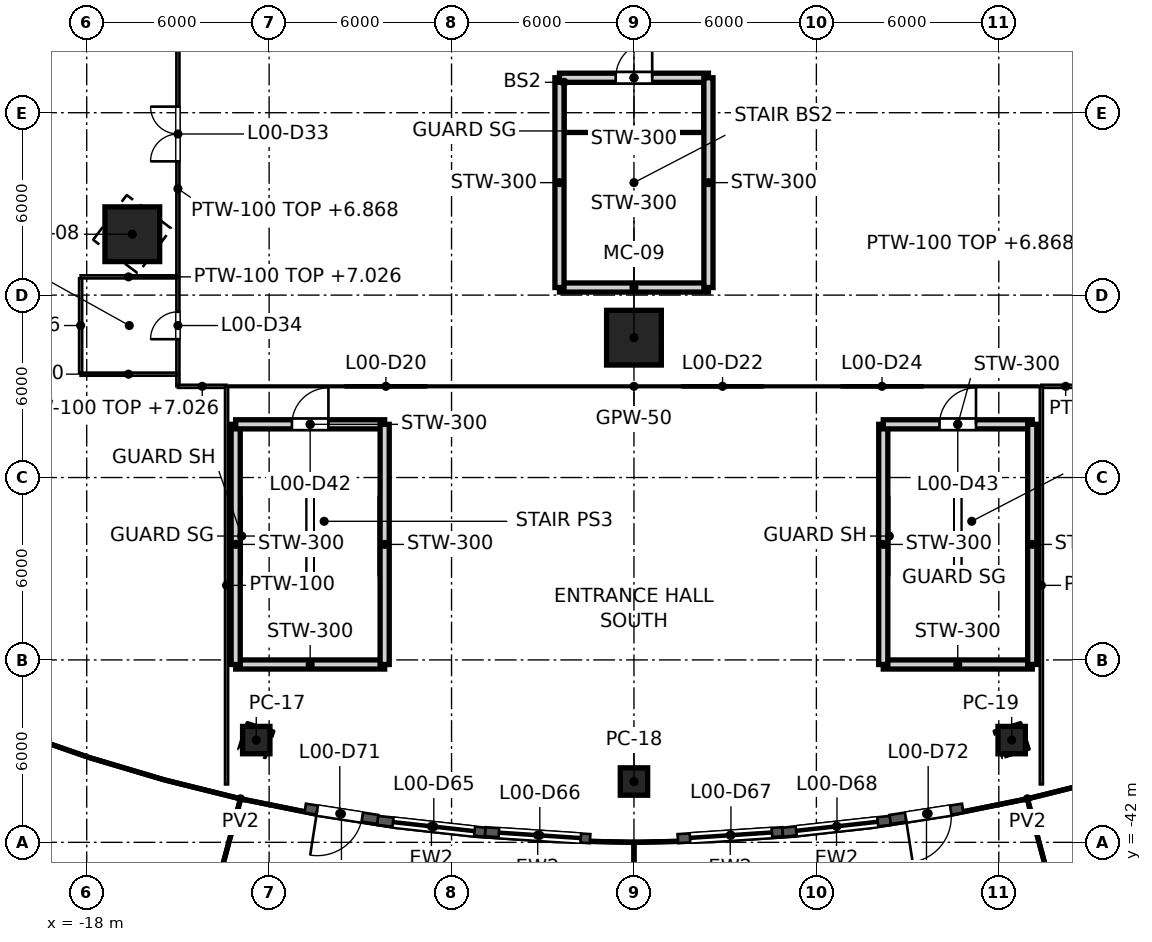
"""IFC4 building model, lengths in metres.
Left out: names, types, materials, properties, quantities, classifications, styles, units other than length and angle.
Written with IfcOpenShell. Run it as: python <this file> out.ifc"""

import sys

from ifc_helpers import new_model, si_unit, direction, frame, frame_2d, origin, origin_2d, place, context, subcontext, project, spatial, rectangle, hollow_rectangle, extrude, element, fill, save


model = new_model("IFC4")
c1 = context("Model", 3, precision=1e-05, world=origin(), true_north=direction((0.0, 1.0)))
c2 = subcontext(c1, "Body", "Model", "MODEL_VIEW")
j1 = project(units=[si_unit("LENGTHUNIT", "METRE"), si_unit("PLANEANGLEUNIT", "RADIAN")], contexts=[c1])
p1 = place(None, origin())
s1 = spatial("IfcSite", under=j1, at=p1, CompositionType="ELEMENT")
p2 = place(p1, origin())
s2 = spatial("IfcBuilding", under=s1, at=p2, CompositionType="ELEMENT")
p3 = place(p2, origin())
s3 = spatial("IfcBuildingStorey", under=s2, at=p3, CompositionType="ELEMENT", Elevation=0.0)
for number, where, z_axis, x_axis in (
    (1, (-16.5, -21.997, 0.0), (0.0, 0.0, 1.0), (-0.6, -0.8, 0.0)),
    (2, (0.0, -25.4, 0.0), (0.0, 0.0, 1.0), (0.0, -1.0, 0.0)),
):
    element("IfcColumn", number, at=place(p3, frame(where, z_axis=z_axis, x_axis=x_axis)), inside=s3, PredefinedType="COLUMN", context=c2, shape_type="SweptSolid", body=[
        extrude(hollow_rectangle(XDim=1.8, YDim=1.8, WallThickness=0.08, at=origin_2d()), origin(), (0.0, 0.0, 1.0), 8.0),
    ])
for number, where, z_axis, x_axis in (
    (3, (-12.423, -38.637, 0.0), (0.0, 0.0, 1.0), (-0.306, -0.952, 0.0)),
    (4, (0.0, -40.0, 0.0), (0.0, 0.0, 1.0), (0.0, -1.0, 0.0)),
    (5, (12.423, -38.637, 0.0), (0.0, 0.0, 1.0), (0.306, -0.952, 0.0)),
):
    element("IfcColumn", number, at=place(p3, frame(where, z_axis=z_axis, x_axis=x_axis)), inside=s3, PredefinedType="COLUMN", context=c2, shape_type="SweptSolid", body=[
        extrude(hollow_rectangle(XDim=0.9, YDim=0.9, WallThickness=0.04, at=origin_2d()), origin(), (0.0, 0.0, 1.0), 8.0),
    ])
p4 = place(p3, frame((-8.434, -41.278, 0.0), z_axis=(0.0, 0.0, 1.0), x_axis=(0.993937913469, -0.109942822269, 0.0)))
e6 = element("IfcWall", 6, at=p4, inside=s3, PredefinedType="SOLIDWALL", context=c2, shape_type="SweptSolid", body=[
    extrude(rectangle(XDim=3.564, YDim=0.3, at=frame_2d((1.782, 0.0))), origin(), (0.0, 0.0, 1.0), 7.8),
])
p5 = place(p4, frame((0.511, 0.0, 0.0)))
e7 = element("IfcOpeningElement", 7, at=p5, cuts=e6, PredefinedType="OPENING", context=c2, shape_type="SweptSolid", body=[
    extrude(rectangle(XDim=2.7, YDim=2.4, at=frame_2d((1.35, 1.2))), frame((0.0, 0.15, 0.0), z_axis=(0.0, -1.0, 0.0), x_axis=(1.0, 0.0, 0.0)), (0.0, 0.0, 1.0), 0.3),
])
p6 = place(p3, frame((-4.889, -41.652, 0.0), z_axis=(0.0, 0.0, 1.0), x_axis=(0.997821919581, -0.065965269678, 0.0)))
e8 = element("IfcWall", 8, at=p6, inside=s3, PredefinedType="SOLIDWALL", context=c2, shape_type="SweptSolid", body=[
    extrude(rectangle(XDim=3.453, YDim=0.3, at=frame_2d((1.727, 0.0))), origin(), (0.0, 0.0, 1.0), 7.8),
])
p7 = place(p6, frame((0.447, 0.0, 0.0)))
e9 = element("IfcOpeningElement", 9, at=p7, cuts=e8, PredefinedType="OPENING", context=c2, shape_type="SweptSolid", body=[
    extrude(rectangle(XDim=2.7, YDim=2.4, at=frame_2d((1.35, 1.2))), frame((0.0, 0.15, 0.0), z_axis=(0.0, -1.0, 0.0), x_axis=(1.0, 0.0, 0.0)), (0.0, 0.0, 1.0), 0.3),
])
p8 = place(p3, frame((1.444, -41.88, 0.0), z_axis=(0.0, 0.0, 1.0), x_axis=(0.997821919581, 0.065965269678, 0.0)))
e10 = element("IfcWall", 10, at=p8, inside=s3, PredefinedType="SOLIDWALL", context=c2, shape_type="SweptSolid", body=[
    extrude(rectangle(XDim=3.453, YDim=0.3, at=frame_2d((1.727, 0.0))), origin(), (0.0, 0.0, 1.0), 7.8),
])
p9 = place(p8, frame((0.4, 0.0, 0.0)))
e11 = element("IfcOpeningElement", 11, at=p9, cuts=e10, PredefinedType="OPENING", context=c2, shape_type="SweptSolid", body=[
    extrude(rectangle(XDim=2.7, YDim=2.4, at=frame_2d((1.35, 1.2))), frame((0.0, 0.15, 0.0), z_axis=(0.0, -1.0, 0.0), x_axis=(1.0, 0.0, 0.0)), (0.0, 0.0, 1.0), 0.3),
])
p10 = place(p3, frame((4.891, -41.67, 0.0), z_axis=(0.0, 0.0, 1.0), x_axis=(0.993937913469, 0.109942822269, 0.0)))
e12 = element("IfcWall", 12, at=p10, inside=s3, PredefinedType="SOLIDWALL", context=c2, shape_type="SweptSolid", body=[
    extrude(rectangle(XDim=3.564, YDim=0.3, at=frame_2d((1.782, 0.0))), origin(), (0.0, 0.0, 1.0), 7.8),
])
p11 = place(p10, frame((0.447, 0.0, 0.0)))
e13 = element("IfcOpeningElement", 13, at=p11, cuts=e12, PredefinedType="OPENING", context=c2, shape_type="SweptSolid", body=[
    extrude(rectangle(XDim=2.7, YDim=2.4, at=frame_2d((1.35, 1.2))), frame((0.0, 0.15, 0.0), z_axis=(0.0, -1.0, 0.0), x_axis=(1.0, 0.0, 0.0)), (0.0, 0.0, 1.0), 0.3),
])
p12 = place(p3, frame((-8.43, -41.248, 0.0), z_axis=(0.0, 0.0, 1.0), x_axis=(-0.988096306645, 0.153836565205, 0.0)))
e14 = element("IfcWall", 14, at=p12, inside=s3, PredefinedType="SOLIDWALL", context=c2, shape_type="SweptSolid", body=[
    extrude(rectangle(XDim=2.412, YDim=0.3, at=frame_2d((1.206, 0.0))), origin(), (0.0, 0.0, 1.0), 7.8),
])
p13 = place(p12, frame((0.512, 0.0, 0.0)))
e15 = element("IfcOpeningElement", 15, at=p13, cuts=e14, PredefinedType="OPENING", context=c2, shape_type="SweptSolid", body=[
    extrude(rectangle(XDim=1.5, YDim=2.1, at=frame_2d((0.75, 1.05))), frame((0.0, 0.15, 0.0), z_axis=(0.0, -1.0, 0.0), x_axis=(1.0, 0.0, 0.0)), (0.0, 0.0, 1.0), 0.3),
])
p14 = place(p3, frame((10.813, -40.877, 0.0), z_axis=(0.0, 0.0, 1.0), x_axis=(-0.988096306645, -0.153836565205, 0.0)))
e16 = element("IfcWall", 16, at=p14, inside=s3, PredefinedType="SOLIDWALL", context=c2, shape_type="SweptSolid", body=[
    extrude(rectangle(XDim=2.412, YDim=0.3, at=frame_2d((1.206, 0.0))), origin(), (0.0, 0.0, 1.0), 7.8),
])
p15 = place(p14, frame((0.4, 0.0, 0.0)))
e17 = element("IfcOpeningElement", 17, at=p15, cuts=e16, PredefinedType="OPENING", context=c2, shape_type="SweptSolid", body=[
    extrude(rectangle(XDim=1.5, YDim=2.1, at=frame_2d((0.75, 1.05))), frame((0.0, 0.15, 0.0), z_axis=(0.0, -1.0, 0.0), x_axis=(1.0, 0.0, 0.0)), (0.0, 0.0, 1.0), 0.3),
])
p16 = place(p3, frame((-8.2, -36.15, 0.0), z_axis=(0.0, 0.0, 1.0), x_axis=(-1.0, 0.0, 0.0)))
e18 = element("IfcWall", 18, at=p16, inside=s3, PredefinedType="SOLIDWALL", context=c2, shape_type="SweptSolid", body=[
    extrude(rectangle(XDim=4.9, YDim=0.3, at=frame_2d((2.45, 0.0))), origin(), (0.0, 0.0, 1.0), 7.8),
])
p17 = place(p3, frame((-13.1, -36.15, 0.0), z_axis=(0.0, 0.0, 1.0), x_axis=(0.0, 1.0, 0.0)))
e19 = element("IfcWall", 19, at=p17, inside=s3, PredefinedType="SOLIDWALL", context=c2, shape_type="SweptSolid", body=[
    extrude(rectangle(XDim=7.9, YDim=0.3, at=frame_2d((3.95, 0.0))), origin(), (0.0, 0.0, 1.0), 7.8),
])
p18 = place(p3, frame((-13.1, -28.25, 0.0), z_axis=(0.0, 0.0, 1.0), x_axis=(1.0, 0.0, 0.0)))
e20 = element("IfcWall", 20, at=p18, inside=s3, PredefinedType="SOLIDWALL", context=c2, shape_type="SweptSolid", body=[
    extrude(rectangle(XDim=4.9, YDim=0.3, at=frame_2d((2.45, 0.0))), origin(), (0.0, 0.0, 1.0), 7.8),
])
p19 = place(p18, frame((1.85, 0.0, 0.0)))
e21 = element("IfcOpeningElement", 21, at=p19, cuts=e20, PredefinedType="OPENING", context=c2, shape_type="SweptSolid", body=[
    extrude(rectangle(XDim=1.2, YDim=2.1, at=frame_2d((0.6, 1.05))), frame((0.0, 0.15, 0.0), z_axis=(0.0, -1.0, 0.0), x_axis=(1.0, 0.0, 0.0)), (0.0, 0.0, 1.0), 0.3),
])
p20 = place(p3, frame((-8.2, -28.25, 0.0), z_axis=(0.0, 0.0, 1.0), x_axis=(0.0, -1.0, 0.0)))
e22 = element("IfcWall", 22, at=p20, inside=s3, PredefinedType="SOLIDWALL", context=c2, shape_type="SweptSolid", body=[
    extrude(rectangle(XDim=7.9, YDim=0.3, at=frame_2d((3.95, 0.0))), origin(), (0.0, 0.0, 1.0), 7.8),
])
p21 = place(p3, frame((13.1, -36.15, 0.0), z_axis=(0.0, 0.0, 1.0), x_axis=(-1.0, 0.0, 0.0)))
e23 = element("IfcWall", 23, at=p21, inside=s3, PredefinedType="SOLIDWALL", context=c2, shape_type="SweptSolid", body=[
    extrude(rectangle(XDim=4.9, YDim=0.3, at=frame_2d((2.45, 0.0))), origin(), (0.0, 0.0, 1.0), 7.8),
])
p22 = place(p3, frame((8.2, -36.15, 0.0), z_axis=(0.0, 0.0, 1.0), x_axis=(0.0, 1.0, 0.0)))
e24 = element("IfcWall", 24, at=p22, inside=s3, PredefinedType="SOLIDWALL", context=c2, shape_type="SweptSolid", body=[
    extrude(rectangle(XDim=7.9, YDim=0.3, at=frame_2d((3.95, 0.0))), origin(), (0.0, 0.0, 1.0), 7.8),
])
p23 = place(p3, frame((8.2, -28.25, 0.0), z_axis=(0.0, 0.0, 1.0), x_axis=(1.0, 0.0, 0.0)))
e25 = element("IfcWall", 25, at=p23, inside=s3, PredefinedType="SOLIDWALL", context=c2, shape_type="SweptSolid", body=[
    extrude(rectangle(XDim=4.9, YDim=0.3, at=frame_2d((2.45, 0.0))), origin(), (0.0, 0.0, 1.0), 7.8),
])
p24 = place(p23, frame((1.85, 0.0, 0.0)))
e26 = element("IfcOpeningElement", 26, at=p24, cuts=e25, PredefinedType="OPENING", context=c2, shape_type="SweptSolid", body=[
    extrude(rectangle(XDim=1.2, YDim=2.1, at=frame_2d((0.6, 1.05))), frame((0.0, 0.15, 0.0), z_axis=(0.0, -1.0, 0.0), x_axis=(1.0, 0.0, 0.0)), (0.0, 0.0, 1.0), 0.3),
])
p25 = place(p3, frame((13.1, -28.25, 0.0), z_axis=(0.0, 0.0, 1.0), x_axis=(0.0, -1.0, 0.0)))
e27 = element("IfcWall", 27, at=p25, inside=s3, PredefinedType="SOLIDWALL", context=c2, shape_type="SweptSolid", body=[
    extrude(rectangle(XDim=7.9, YDim=0.3, at=frame_2d((3.95, 0.0))), origin(), (0.0, 0.0, 1.0), 7.8),
])
p26 = place(p3, frame((2.45, -23.75, 0.0), z_axis=(0.0, 0.0, 1.0), x_axis=(-1.0, 0.0, 0.0)))
e28 = element("IfcWall", 28, at=p26, inside=s3, PredefinedType="SOLIDWALL", context=c2, shape_type="SweptSolid", body=[
    extrude(rectangle(XDim=4.9, YDim=0.3, at=frame_2d((2.45, 0.0))), origin(), (0.0, 0.0, 1.0), 7.8),
])
p27 = place(p3, frame((-2.45, -23.75, 0.0), z_axis=(0.0, 0.0, 1.0), x_axis=(0.0, 1.0, 0.0)))
e29 = element("IfcWall", 29, at=p27, inside=s3, PredefinedType="SOLIDWALL", context=c2, shape_type="SweptSolid", body=[
    extrude(rectangle(XDim=6.9, YDim=0.3, at=frame_2d((3.45, 0.0))), origin(), (0.0, 0.0, 1.0), 7.8),
])
p28 = place(p3, frame((-2.45, -16.85, 0.0), z_axis=(0.0, 0.0, 1.0), x_axis=(1.0, 0.0, 0.0)))
e30 = element("IfcWall", 30, at=p28, inside=s3, PredefinedType="SOLIDWALL", context=c2, shape_type="SweptSolid", body=[
    extrude(rectangle(XDim=4.9, YDim=0.3, at=frame_2d((2.45, 0.0))), origin(), (0.0, 0.0, 1.0), 7.8),
])
p29 = place(p28, frame((1.85, 0.0, 0.0)))
e31 = element("IfcOpeningElement", 31, at=p29, cuts=e30, PredefinedType="OPENING", context=c2, shape_type="SweptSolid", body=[
    extrude(rectangle(XDim=1.2, YDim=2.1, at=frame_2d((0.6, 1.05))), frame((0.0, 0.15, 0.0), z_axis=(0.0, -1.0, 0.0), x_axis=(1.0, 0.0, 0.0)), (0.0, 0.0, 1.0), 0.3),
])
p30 = place(p3, frame((2.45, -16.85, 0.0), z_axis=(0.0, 0.0, 1.0), x_axis=(0.0, -1.0, 0.0)))
e32 = element("IfcWall", 32, at=p30, inside=s3, PredefinedType="SOLIDWALL", context=c2, shape_type="SweptSolid", body=[
    extrude(rectangle(XDim=6.9, YDim=0.3, at=frame_2d((3.45, 0.0))), origin(), (0.0, 0.0, 1.0), 7.8),
])
p31 = place(p3, frame((15.0, -27.0, 0.0), z_axis=(0.0, 0.0, 1.0), x_axis=(-1.0, 0.0, 0.0)))
e33 = element("IfcWall", 33, at=p31, inside=s3, PredefinedType="PARTITIONING", context=c2, shape_type="SweptSolid", body=[
    extrude(rectangle(XDim=1.6, YDim=0.1, at=frame_2d((0.8, 0.0))), origin(), (0.0, 0.0, 1.0), 7.026),
])
p32 = place(p3, frame((13.4, -27.0, 0.0), z_axis=(0.0, 0.0, 1.0), x_axis=(0.0, -1.0, 0.0)))
e34 = element("IfcWall", 34, at=p32, inside=s3, PredefinedType="PARTITIONING", context=c2, shape_type="SweptSolid", body=[
    extrude(rectangle(XDim=13.094, YDim=0.1, at=frame_2d((6.547, 0.0))), origin(), (0.0, 0.0, 1.0), 6.877),
])
p33 = place(p3, frame((-15.0, -14.0, 0.0), z_axis=(0.0, 0.0, 1.0), x_axis=(0.0, -1.0, 0.0)))
e35 = element("IfcWall", 35, at=p33, inside=s3, PredefinedType="PARTITIONING", context=c2, shape_type="SweptSolid", body=[
    extrude(rectangle(XDim=13.0, YDim=0.1, at=frame_2d((6.5, 0.0))), origin(), (0.0, 0.0, 1.0), 6.868),
])
p34 = place(p33, frame((3.8, 0.0, 0.0)))
e36 = element("IfcOpeningElement", 36, at=p34, cuts=e35, PredefinedType="OPENING", context=c2, shape_type="SweptSolid", body=[
    extrude(rectangle(XDim=1.8, YDim=2.1, at=frame_2d((0.9, 1.05))), frame((0.0, 0.05, 0.0), z_axis=(0.0, -1.0, 0.0), x_axis=(1.0, 0.0, 0.0)), (0.0, 0.0, 1.0), 0.1),
])
p35 = place(p33, frame((10.55, 0.0, 0.0)))
e37 = element("IfcOpeningElement", 37, at=p35, cuts=e35, PredefinedType="OPENING", context=c2, shape_type="SweptSolid", body=[
    extrude(rectangle(XDim=0.9, YDim=2.1, at=frame_2d((0.45, 1.05))), frame((0.0, 0.05, 0.0), z_axis=(0.0, -1.0, 0.0), x_axis=(1.0, 0.0, 0.0)), (0.0, 0.0, 1.0), 0.1),
])
p36 = place(p3, frame((-15.0, -27.0, 0.0), z_axis=(0.0, 0.0, 1.0), x_axis=(1.0, 0.0, 0.0)))
e38 = element("IfcWall", 38, at=p36, inside=s3, PredefinedType="PARTITIONING", context=c2, shape_type="SweptSolid", body=[
    extrude(rectangle(XDim=1.6, YDim=0.1, at=frame_2d((0.8, 0.0))), origin(), (0.0, 0.0, 1.0), 7.026),
])
p37 = place(p3, frame((-13.4, -27.0, 0.0), z_axis=(0.0, 0.0, 1.0), x_axis=(0.0, -1.0, 0.0)))
e39 = element("IfcWall", 39, at=p37, inside=s3, PredefinedType="PARTITIONING", context=c2, shape_type="SweptSolid", body=[
    extrude(rectangle(XDim=13.094, YDim=0.1, at=frame_2d((6.547, 0.0))), origin(), (0.0, 0.0, 1.0), 6.877),
])
p38 = place(p3, frame((-13.304, -27.0, 0.0), z_axis=(0.0, 0.0, 1.0), x_axis=(1.0, 0.0, 0.0)))
e40 = element("IfcWall", 40, at=p38, inside=s3, PredefinedType="PARTITIONING", context=c2, shape_type="SweptSolid", body=[
    extrude(rectangle(XDim=26.608, YDim=0.05, at=frame_2d((13.304, 0.0))), origin(), (0.0, 0.0, 1.0), 7.026),
])
p39 = place(p38, frame((3.796, 0.0, 0.0)))
e41 = element("IfcOpeningElement", 41, at=p39, cuts=e40, PredefinedType="OPENING", context=c2, shape_type="SweptSolid", body=[
    extrude(rectangle(XDim=2.7, YDim=2.4, at=frame_2d((1.35, 1.2))), frame((0.0, 0.025, 0.0), z_axis=(0.0, -1.0, 0.0), x_axis=(1.0, 0.0, 0.0)), (0.0, 0.0, 1.0), 0.05),
])
p40 = place(p38, frame((14.868, 0.0, 0.0)))
e42 = element("IfcOpeningElement", 42, at=p40, cuts=e40, PredefinedType="OPENING", context=c2, shape_type="SweptSolid", body=[
    extrude(rectangle(XDim=2.7, YDim=2.4, at=frame_2d((1.35, 1.2))), frame((0.0, 0.025, 0.0), z_axis=(0.0, -1.0, 0.0), x_axis=(1.0, 0.0, 0.0)), (0.0, 0.0, 1.0), 0.05),
])
p41 = place(p38, frame((20.112, 0.0, 0.0)))
e43 = element("IfcOpeningElement", 43, at=p41, cuts=e40, PredefinedType="OPENING", context=c2, shape_type="SweptSolid", body=[
    extrude(rectangle(XDim=2.7, YDim=2.4, at=frame_2d((1.35, 1.2))), frame((0.0, 0.025, 0.0), z_axis=(0.0, -1.0, 0.0), x_axis=(1.0, 0.0, 0.0)), (0.0, 0.0, 1.0), 0.05),
])
p42 = place(p3, frame((-18.2, -26.6, 0.0), z_axis=(0.0, 0.0, 1.0), x_axis=(1.0, 0.0, 0.0)))
e44 = element("IfcWall", 44, at=p42, inside=s3, PredefinedType="PARTITIONING", context=c2, shape_type="SweptSolid", body=[
    extrude(rectangle(XDim=3.15, YDim=0.1, at=frame_2d((1.575, 0.0))), origin(), (0.0, 0.0, 1.0), 7.8),
])
p43 = place(p3, frame((-18.2, -23.4, 0.0), z_axis=(0.0, 0.0, 1.0), x_axis=(1.0, 0.0, 0.0)))
e45 = element("IfcWall", 45, at=p43, inside=s3, PredefinedType="PARTITIONING", context=c2, shape_type="SweptSolid", body=[
    extrude(rectangle(XDim=3.15, YDim=0.1, at=frame_2d((1.575, 0.0))), origin(), (0.0, 0.0, 1.0), 7.026),
])
p44 = place(p3, frame((-18.2, -26.55, 0.0), z_axis=(0.0, 0.0, 1.0), x_axis=(0.0, 1.0, 0.0)))
e46 = element("IfcWall", 46, at=p44, inside=s3, PredefinedType="PARTITIONING", context=c2, shape_type="SweptSolid", body=[
    extrude(rectangle(XDim=3.1, YDim=0.1, at=frame_2d((1.55, 0.0))), origin(), (0.0, 0.0, 1.0), 7.026),
])
p45 = place(p5, origin())
e47 = element("IfcDoor", 47, at=p45, inside=s3, OperationType="DOUBLE_DOOR_SLIDING", PredefinedType="DOOR", context=c2, shape_type="SweptSolid", body=[
    extrude(rectangle(XDim=2.7, YDim=2.4, at=frame_2d((1.35, 1.2))), frame((0.0, 0.025, 0.0), z_axis=(0.0, -1.0, 0.0), x_axis=(1.0, 0.0, 0.0)), (0.0, 0.0, 1.0), 0.05),
])
fill(e7, e47)
p46 = place(p7, origin())
e48 = element("IfcDoor", 48, at=p46, inside=s3, OperationType="DOUBLE_DOOR_SLIDING", PredefinedType="DOOR", context=c2, shape_type="SweptSolid", body=[
    extrude(rectangle(XDim=2.7, YDim=2.4, at=frame_2d((1.35, 1.2))), frame((0.0, 0.025, 0.0), z_axis=(0.0, -1.0, 0.0), x_axis=(1.0, 0.0, 0.0)), (0.0, 0.0, 1.0), 0.05),
])
fill(e9, e48)
p47 = place(p9, origin())
e49 = element("IfcDoor", 49, at=p47, inside=s3, OperationType="DOUBLE_DOOR_SLIDING", PredefinedType="DOOR", context=c2, shape_type="SweptSolid", body=[
    extrude(rectangle(XDim=2.7, YDim=2.4, at=frame_2d((1.35, 1.2))), frame((0.0, 0.025, 0.0), z_axis=(0.0, -1.0, 0.0), x_axis=(1.0, 0.0, 0.0)), (0.0, 0.0, 1.0), 0.05),
])
fill(e11, e49)
p48 = place(p11, origin())
e50 = element("IfcDoor", 50, at=p48, inside=s3, OperationType="DOUBLE_DOOR_SLIDING", PredefinedType="DOOR", context=c2, shape_type="SweptSolid", body=[
    extrude(rectangle(XDim=2.7, YDim=2.4, at=frame_2d((1.35, 1.2))), frame((0.0, 0.025, 0.0), z_axis=(0.0, -1.0, 0.0), x_axis=(1.0, 0.0, 0.0)), (0.0, 0.0, 1.0), 0.05),
])
fill(e13, e50)
p49 = place(p13, origin())
e51 = element("IfcDoor", 51, at=p49, inside=s3, OperationType="SINGLE_SWING_RIGHT", PredefinedType="DOOR", context=c2, shape_type="SweptSolid", body=[
    extrude(rectangle(XDim=1.5, YDim=2.1, at=frame_2d((0.75, 1.05))), frame((0.0, 0.025, 0.0), z_axis=(0.0, -1.0, 0.0), x_axis=(1.0, 0.0, 0.0)), (0.0, 0.0, 1.0), 0.05),
])
fill(e15, e51)
p50 = place(p15, origin())
e52 = element("IfcDoor", 52, at=p50, inside=s3, OperationType="SINGLE_SWING_RIGHT", PredefinedType="DOOR", context=c2, shape_type="SweptSolid", body=[
    extrude(rectangle(XDim=1.5, YDim=2.1, at=frame_2d((0.75, 1.05))), frame((0.0, 0.025, 0.0), z_axis=(0.0, -1.0, 0.0), x_axis=(1.0, 0.0, 0.0)), (0.0, 0.0, 1.0), 0.05),
])
fill(e17, e52)
p51 = place(p39, origin())
e53 = element("IfcDoor", 53, at=p51, inside=s3, OperationType="DOUBLE_DOOR_SLIDING", PredefinedType="DOOR", context=c2, shape_type="SweptSolid", body=[
    extrude(rectangle(XDim=2.7, YDim=2.4, at=frame_2d((1.35, 1.2))), frame((0.0, 0.025, 0.0), z_axis=(0.0, -1.0, 0.0), x_axis=(1.0, 0.0, 0.0)), (0.0, 0.0, 1.0), 0.05),
])
fill(e41, e53)
p52 = place(p40, origin())
e54 = element("IfcDoor", 54, at=p52, inside=s3, OperationType="DOUBLE_DOOR_SLIDING", PredefinedType="DOOR", context=c2, shape_type="SweptSolid", body=[
    extrude(rectangle(XDim=2.7, YDim=2.4, at=frame_2d((1.35, 1.2))), frame((0.0, 0.025, 0.0), z_axis=(0.0, -1.0, 0.0), x_axis=(1.0, 0.0, 0.0)), (0.0, 0.0, 1.0), 0.05),
])
fill(e42, e54)
p53 = place(p41, origin())
e55 = element("IfcDoor", 55, at=p53, inside=s3, OperationType="DOUBLE_DOOR_SLIDING", PredefinedType="DOOR", context=c2, shape_type="SweptSolid", body=[
    extrude(rectangle(XDim=2.7, YDim=2.4, at=frame_2d((1.35, 1.2))), frame((0.0, 0.025, 0.0), z_axis=(0.0, -1.0, 0.0), x_axis=(1.0, 0.0, 0.0)), (0.0, 0.0, 1.0), 0.05),
])
fill(e43, e55)
p54 = place(p34, origin())
e56 = element("IfcDoor", 56, at=p54, inside=s3, OperationType="DOUBLE_DOOR_SINGLE_SWING", PredefinedType="DOOR", context=c2, shape_type="SweptSolid", body=[
    extrude(rectangle(XDim=1.8, YDim=2.1, at=frame_2d((0.9, 1.05))), frame((0.0, 0.025, 0.0), z_axis=(0.0, -1.0, 0.0), x_axis=(1.0, 0.0, 0.0)), (0.0, 0.0, 1.0), 0.05),
])
fill(e36, e56)
p55 = place(p35, origin())
e57 = element("IfcDoor", 57, at=p55, inside=s3, OperationType="SINGLE_SWING_RIGHT", PredefinedType="DOOR", context=c2, shape_type="SweptSolid", body=[
    extrude(rectangle(XDim=0.9, YDim=2.1, at=frame_2d((0.45, 1.05))), frame((0.0, 0.025, 0.0), z_axis=(0.0, -1.0, 0.0), x_axis=(1.0, 0.0, 0.0)), (0.0, 0.0, 1.0), 0.05),
])
fill(e37, e57)
p56 = place(p19, origin())
e58 = element("IfcDoor", 58, at=p56, inside=s3, OperationType="SINGLE_SWING_RIGHT", PredefinedType="DOOR", context=c2, shape_type="SweptSolid", body=[
    extrude(rectangle(XDim=1.2, YDim=2.1, at=frame_2d((0.6, 1.05))), frame((0.0, 0.025, 0.0), z_axis=(0.0, -1.0, 0.0), x_axis=(1.0, 0.0, 0.0)), (0.0, 0.0, 1.0), 0.05),
])
fill(e21, e58)
p57 = place(p24, origin())
e59 = element("IfcDoor", 59, at=p57, inside=s3, OperationType="SINGLE_SWING_RIGHT", PredefinedType="DOOR", context=c2, shape_type="SweptSolid", body=[
    extrude(rectangle(XDim=1.2, YDim=2.1, at=frame_2d((0.6, 1.05))), frame((0.0, 0.025, 0.0), z_axis=(0.0, -1.0, 0.0), x_axis=(1.0, 0.0, 0.0)), (0.0, 0.0, 1.0), 0.05),
])
fill(e26, e59)
p58 = place(p29, origin())
e60 = element("IfcDoor", 60, at=p58, inside=s3, OperationType="SINGLE_SWING_RIGHT", PredefinedType="DOOR", context=c2, shape_type="SweptSolid", body=[
    extrude(rectangle(XDim=1.2, YDim=2.1, at=frame_2d((0.6, 1.05))), frame((0.0, 0.025, 0.0), z_axis=(0.0, -1.0, 0.0), x_axis=(1.0, 0.0, 0.0)), (0.0, 0.0, 1.0), 0.05),
])
fill(e31, e60)
save(model, sys.argv[1])
